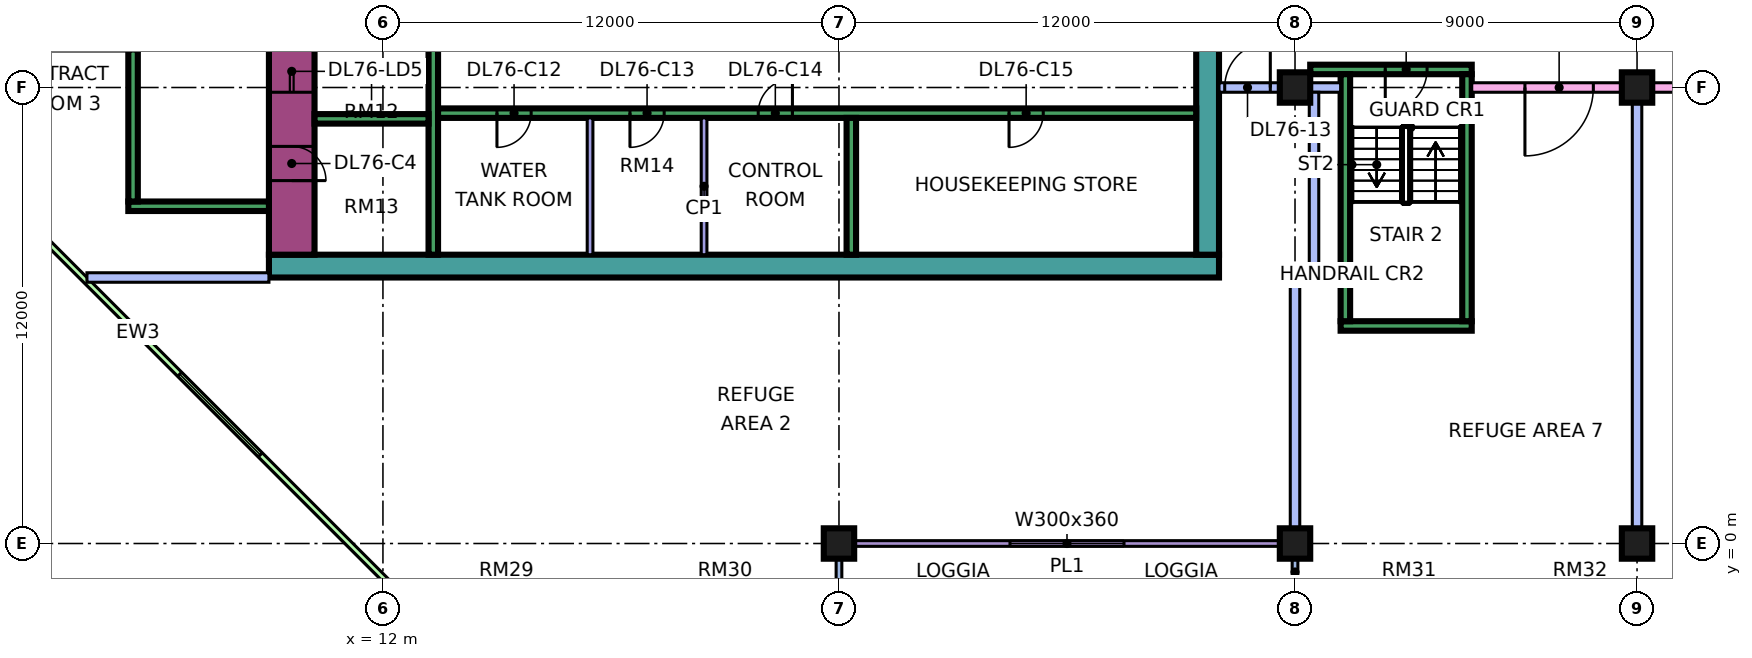
"""IFC4 building model, lengths in metres.
Left out: names, types, materials, properties, quantities, classifications, styles, units other than length and angle.
Written with IfcOpenShell. Run it as: python <this file> out.ifc"""

import sys

from ifc_helpers import new_model, si_unit, direction, frame, frame_2d, origin, origin_2d, place, context, subcontext, project, spatial, rectangle, extrude, element, fill, save


model = new_model("IFC4")
c1 = context("Model", 3, precision=1e-05, world=origin(), true_north=direction((0.0, 1.0)))
c2 = subcontext(c1, "Body", "Model", "MODEL_VIEW")
j1 = project(units=[si_unit("LENGTHUNIT", "METRE"), si_unit("PLANEANGLEUNIT", "RADIAN")], contexts=[c1])
p1 = place(None, origin())
s1 = spatial("IfcSite", under=j1, at=p1, CompositionType="ELEMENT")
p2 = place(p1, origin())
s2 = spatial("IfcBuilding", under=s1, at=p2, CompositionType="ELEMENT")
p3 = place(p2, frame((0.0, 0.0, 322.15)))
s3 = spatial("IfcBuildingStorey", under=s2, at=p3, CompositionType="ELEMENT", Elevation=322.15)
for number, where, z_axis, x_axis in (
    (1, (24.0, 0.0, 0.0), (0.0, 0.0, 1.0), (1.0, 0.0, 0.0)),
    (2, (36.0, 0.0, 0.0), (0.0, 0.0, 1.0), (1.0, 0.0, 0.0)),
    (3, (36.0, 12.0, 0.0), (0.0, 0.0, 1.0), (1.0, 0.0, 0.0)),
    (4, (45.0, 0.0, 0.0), (0.0, 0.0, 1.0), (1.0, 0.0, 0.0)),
    (5, (45.0, 12.0, 0.0), (0.0, 0.0, 1.0), (1.0, 0.0, 0.0)),
):
    element("IfcColumn", number, at=place(p3, frame(where, z_axis=z_axis, x_axis=x_axis)), inside=s3, PredefinedType="COLUMN", context=c2, shape_type="SweptSolid", body=[
        extrude(rectangle(XDim=0.8, YDim=0.8, at=origin_2d()), origin(), (0.0, 0.0, 1.0), 5.5),
    ])
p4 = place(p3, frame((9.0, 7.3, 0.0), z_axis=(0.0, 0.0, 1.0), x_axis=(1.0, 0.0, 0.0)))
e6 = element("IfcWall", 6, at=p4, inside=s3, PredefinedType="SHEAR", context=c2, shape_type="SweptSolid", body=[
    extrude(rectangle(XDim=25.0, YDim=0.6, at=frame_2d((12.5, 0.0))), origin(), (0.0, 0.0, 1.0), 5.5),
])
p5 = place(p3, frame((9.6, 7.6, 0.0), z_axis=(0.0, 0.0, 1.0), x_axis=(0.0, 1.0, 0.0)))
e7 = element("IfcWall", 7, at=p5, inside=s3, PredefinedType="SHEAR", context=c2, shape_type="SweptSolid", body=[
    extrude(rectangle(XDim=11.8, YDim=1.2, at=frame_2d((5.9, 0.0))), origin(), (0.0, 0.0, 1.0), 5.5),
])
p6 = place(p5, frame((4.275, 0.0, 0.0)))
e8 = element("IfcOpeningElement", 8, at=p6, cuts=e7, PredefinedType="OPENING", context=c2, shape_type="SweptSolid", body=[
    extrude(rectangle(XDim=1.1, YDim=2.2, at=frame_2d((0.55, 1.1))), frame((0.0, 0.61, 0.0), z_axis=(0.0, -1.0, 0.0), x_axis=(1.0, 0.0, 0.0)), (0.0, 0.0, 1.0), 1.22),
])
p7 = place(p5, frame((6.775, 0.0, 0.0)))
e9 = element("IfcOpeningElement", 9, at=p7, cuts=e7, PredefinedType="OPENING", context=c2, shape_type="SweptSolid", body=[
    extrude(rectangle(XDim=1.1, YDim=2.2, at=frame_2d((0.55, 1.1))), frame((0.0, 0.61, 0.0), z_axis=(0.0, -1.0, 0.0), x_axis=(1.0, 0.0, 0.0)), (0.0, 0.0, 1.0), 1.22),
])
p8 = place(p5, frame((9.7, 0.0, 0.0)))
e10 = element("IfcOpeningElement", 10, at=p8, cuts=e7, PredefinedType="OPENING", context=c2, shape_type="SweptSolid", body=[
    extrude(rectangle(XDim=1.1, YDim=2.2, at=frame_2d((0.55, 1.1))), frame((0.0, 0.61, 0.0), z_axis=(0.0, -1.0, 0.0), x_axis=(1.0, 0.0, 0.0)), (0.0, 0.0, 1.0), 1.22),
])
p9 = place(p5, frame((1.95, 0.0, 0.0)))
e11 = element("IfcOpeningElement", 11, at=p9, cuts=e7, PredefinedType="OPENING", context=c2, shape_type="SweptSolid", body=[
    extrude(rectangle(XDim=0.9, YDim=2.1, at=frame_2d((0.45, 1.05))), frame((0.0, 0.61, 0.0), z_axis=(0.0, -1.0, 0.0), x_axis=(1.0, 0.0, 0.0)), (0.0, 0.0, 1.0), 1.22),
])
p10 = place(p3, frame((33.7, 7.6, 0.0), z_axis=(0.0, 0.0, 1.0), x_axis=(0.0, 1.0, 0.0)))
e12 = element("IfcWall", 12, at=p10, inside=s3, PredefinedType="SHEAR", context=c2, shape_type="SweptSolid", body=[
    extrude(rectangle(XDim=11.8, YDim=0.6, at=frame_2d((5.9, 0.0))), origin(), (0.0, 0.0, 1.0), 5.5),
])
p11 = place(p10, frame((5.6, 0.0, 0.0)))
e13 = element("IfcOpeningElement", 13, at=p11, cuts=e12, PredefinedType="OPENING", context=c2, shape_type="SweptSolid", body=[
    extrude(rectangle(XDim=1.8, YDim=2.4, at=frame_2d((0.9, 1.2))), frame((0.0, 0.31, 0.0), z_axis=(0.0, -1.0, 0.0), x_axis=(1.0, 0.0, 0.0)), (0.0, 0.0, 1.0), 0.62),
])
p12 = place(p3, frame((13.325, 7.6, 0.0), z_axis=(0.0, 0.0, 1.0), x_axis=(0.0, 1.0, 0.0)))
e14 = element("IfcWall", 14, at=p12, inside=s3, PredefinedType="SHEAR", context=c2, shape_type="SweptSolid", body=[
    extrude(rectangle(XDim=11.8, YDim=0.25, at=frame_2d((5.9, 0.0))), origin(), (0.0, 0.0, 1.0), 5.5),
])
p13 = place(p3, frame((13.45, 11.325, 0.0), z_axis=(0.0, 0.0, 1.0), x_axis=(1.0, 0.0, 0.0)))
e15 = element("IfcWall", 15, at=p13, inside=s3, PredefinedType="SHEAR", context=c2, shape_type="SweptSolid", body=[
    extrude(rectangle(XDim=19.95, YDim=0.25, at=frame_2d((9.975, 0.0))), origin(), (0.0, 0.0, 1.0), 5.5),
])
p14 = place(p13, frame((1.55, 0.0, 0.0)))
e16 = element("IfcOpeningElement", 16, at=p14, cuts=e15, PredefinedType="OPENING", context=c2, shape_type="SweptSolid", body=[
    extrude(rectangle(XDim=0.9, YDim=2.1, at=frame_2d((0.45, 1.05))), frame((0.0, 0.135, 0.0), z_axis=(0.0, -1.0, 0.0), x_axis=(1.0, 0.0, 0.0)), (0.0, 0.0, 1.0), 0.27),
])
p15 = place(p13, frame((5.05, 0.0, 0.0)))
e17 = element("IfcOpeningElement", 17, at=p15, cuts=e15, PredefinedType="OPENING", context=c2, shape_type="SweptSolid", body=[
    extrude(rectangle(XDim=0.9, YDim=2.1, at=frame_2d((0.45, 1.05))), frame((0.0, 0.135, 0.0), z_axis=(0.0, -1.0, 0.0), x_axis=(1.0, 0.0, 0.0)), (0.0, 0.0, 1.0), 0.27),
])
p16 = place(p13, frame((8.425, 0.0, 0.0)))
e18 = element("IfcOpeningElement", 18, at=p16, cuts=e15, PredefinedType="OPENING", context=c2, shape_type="SweptSolid", body=[
    extrude(rectangle(XDim=0.9, YDim=2.1, at=frame_2d((0.45, 1.05))), frame((0.0, 0.135, 0.0), z_axis=(0.0, -1.0, 0.0), x_axis=(1.0, 0.0, 0.0)), (0.0, 0.0, 1.0), 0.27),
])
p17 = place(p13, frame((15.025, 0.0, 0.0)))
e19 = element("IfcOpeningElement", 19, at=p17, cuts=e15, PredefinedType="OPENING", context=c2, shape_type="SweptSolid", body=[
    extrude(rectangle(XDim=0.9, YDim=2.1, at=frame_2d((0.45, 1.05))), frame((0.0, 0.135, 0.0), z_axis=(0.0, -1.0, 0.0), x_axis=(1.0, 0.0, 0.0)), (0.0, 0.0, 1.0), 0.27),
])
p18 = place(p3, frame((10.2, 11.175, 0.0), z_axis=(0.0, 0.0, 1.0), x_axis=(1.0, 0.0, 0.0)))
e20 = element("IfcWall", 20, at=p18, inside=s3, PredefinedType="SHEAR", context=c2, shape_type="SweptSolid", body=[
    extrude(rectangle(XDim=3.0, YDim=0.25, at=frame_2d((1.5, 0.0))), origin(), (0.0, 0.0, 1.0), 5.5),
])
p19 = place(p3, frame((24.325, 7.6, 0.0), z_axis=(0.0, 0.0, 1.0), x_axis=(0.0, 1.0, 0.0)))
e21 = element("IfcWall", 21, at=p19, inside=s3, PredefinedType="SHEAR", context=c2, shape_type="SweptSolid", body=[
    extrude(rectangle(XDim=3.6, YDim=0.25, at=frame_2d((1.8, 0.0))), origin(), (0.0, 0.0, 1.0), 5.5),
])
p20 = place(p3, frame((5.3, 8.875, 0.0), z_axis=(0.0, 0.0, 1.0), x_axis=(1.0, 0.0, 0.0)))
e22 = element("IfcWall", 22, at=p20, inside=s3, PredefinedType="SHEAR", context=c2, shape_type="SweptSolid", body=[
    extrude(rectangle(XDim=3.7, YDim=0.25, at=frame_2d((1.85, 0.0))), origin(), (0.0, 0.0, 1.0), 5.5),
])
p21 = place(p3, frame((5.425, 9.0, 0.0), z_axis=(0.0, 0.0, 1.0), x_axis=(0.0, 1.0, 0.0)))
e23 = element("IfcWall", 23, at=p21, inside=s3, PredefinedType="SHEAR", context=c2, shape_type="SweptSolid", body=[
    extrude(rectangle(XDim=4.0, YDim=0.25, at=frame_2d((2.0, 0.0))), origin(), (0.0, 0.0, 1.0), 5.5),
])
p22 = place(p3, frame((37.2, 5.725, 0.0), z_axis=(0.0, 0.0, 1.0), x_axis=(1.0, 0.0, 0.0)))
e24 = element("IfcWall", 24, at=p22, inside=s3, PredefinedType="SHEAR", context=c2, shape_type="SweptSolid", body=[
    extrude(rectangle(XDim=3.45, YDim=0.25, at=frame_2d((1.725, 0.0))), origin(), (0.0, 0.0, 1.0), 5.5),
])
p23 = place(p3, frame((36.4, 12.475, 0.0), z_axis=(0.0, 0.0, 1.0), x_axis=(1.0, 0.0, 0.0)))
e25 = element("IfcWall", 25, at=p23, inside=s3, PredefinedType="SHEAR", context=c2, shape_type="SweptSolid", body=[
    extrude(rectangle(XDim=4.25, YDim=0.25, at=frame_2d((2.125, 0.0))), origin(), (0.0, 0.0, 1.0), 5.5),
])
p24 = place(p23, frame((1.975, 0.0, 0.0)))
e26 = element("IfcOpeningElement", 26, at=p24, cuts=e25, PredefinedType="OPENING", context=c2, shape_type="SweptSolid", body=[
    extrude(rectangle(XDim=1.1, YDim=2.2, at=frame_2d((0.55, 1.1))), frame((0.0, 0.135, 0.0), z_axis=(0.0, -1.0, 0.0), x_axis=(1.0, 0.0, 0.0)), (0.0, 0.0, 1.0), 0.27),
])
for number, where, z_axis, x_axis in (
    (27, (37.325, 5.85, 0.0), (0.0, 0.0, 1.0), (0.0, 1.0, 0.0)),
    (28, (40.525, 5.85, 0.0), (0.0, 0.0, 1.0), (0.0, 1.0, 0.0)),
):
    element("IfcWall", number, at=place(p3, frame(where, z_axis=z_axis, x_axis=x_axis)), inside=s3, PredefinedType="SHEAR", context=c2, shape_type="SweptSolid", body=[
        extrude(rectangle(XDim=6.5, YDim=0.25, at=frame_2d((3.25, 0.0))), origin(), (0.0, 0.0, 1.0), 5.5),
    ])
p25 = place(p3, frame((-1.447, 12.553, 0.0), z_axis=(0.0, 0.0, 1.0), x_axis=(0.707106781187, -0.707106781187, 0.0)))
e29 = element("IfcWall", 29, at=p25, inside=s3, PredefinedType="SOLIDWALL", context=c2, shape_type="SweptSolid", body=[
    extrude(rectangle(XDim=19.799, YDim=0.15, at=frame_2d((9.899, 0.0))), origin(), (0.0, 0.0, 1.0), 5.05),
])
p26 = place(p25, frame((11.453, 0.0, 0.45)))
e30 = element("IfcOpeningElement", 30, at=p26, cuts=e29, PredefinedType="OPENING", context=c2, shape_type="SweptSolid", body=[
    extrude(rectangle(XDim=3.0, YDim=3.6, at=frame_2d((1.5, 1.8))), frame((0.0, 0.085, 0.0), z_axis=(0.0, -1.0, 0.0), x_axis=(1.0, 0.0, 0.0)), (0.0, 0.0, 1.0), 0.17),
])
p27 = place(p3, frame((24.075, 0.0, 0.0), z_axis=(0.0, 0.0, 1.0), x_axis=(1.0, 0.0, 0.0)))
e31 = element("IfcWall", 31, at=p27, inside=s3, PredefinedType="SOLIDWALL", context=c2, shape_type="SweptSolid", body=[
    extrude(rectangle(XDim=11.85, YDim=0.15, at=frame_2d((5.925, 0.0))), origin(), (0.0, 0.0, 1.0), 5.05),
])
p28 = place(p27, frame((4.425, 0.0, 0.45)))
e32 = element("IfcOpeningElement", 32, at=p28, cuts=e31, PredefinedType="OPENING", context=c2, shape_type="SweptSolid", body=[
    extrude(rectangle(XDim=3.0, YDim=3.6, at=frame_2d((1.5, 1.8))), frame((0.0, 0.085, 0.0), z_axis=(0.0, -1.0, 0.0), x_axis=(1.0, 0.0, 0.0)), (0.0, 0.0, 1.0), 0.17),
])
for number, where, z_axis, x_axis in (
    (33, (24.0, -1.5, 0.0), (0.0, 0.0, 1.0), (0.0, 1.0, 0.0)),
    (34, (36.0, -1.5, 0.0), (0.0, 0.0, 1.0), (0.0, 1.0, 0.0)),
):
    element("IfcWall", number, at=place(p3, frame(where, z_axis=z_axis, x_axis=x_axis)), inside=s3, PredefinedType="SOLIDWALL", context=c2, shape_type="SweptSolid", body=[
        extrude(rectangle(XDim=1.5, YDim=0.15, at=frame_2d((0.75, 0.0))), origin(), (0.0, 0.0, 1.0), 5.05),
    ])
for number, where, z_axis, x_axis in (
    (35, (17.45, 7.6, 0.0), (0.0, 0.0, 1.0), (0.0, 1.0, 0.0)),
    (36, (20.45, 7.6, 0.0), (0.0, 0.0, 1.0), (0.0, 1.0, 0.0)),
):
    element("IfcWall", number, at=place(p3, frame(where, z_axis=z_axis, x_axis=x_axis)), inside=s3, PredefinedType="PARTITIONING", context=c2, shape_type="SweptSolid", body=[
        extrude(rectangle(XDim=3.6, YDim=0.15, at=frame_2d((1.8, 0.0))), origin(), (0.0, 0.0, 1.0), 5.05),
    ])
p29 = place(p3, frame((4.211, 7.0, 0.0), z_axis=(0.0, 0.0, 1.0), x_axis=(1.0, 0.0, 0.0)))
e37 = element("IfcWall", 37, at=p29, inside=s3, PredefinedType="PARTITIONING", context=c2, shape_type="SweptSolid", body=[
    extrude(rectangle(XDim=4.789, YDim=0.25, at=frame_2d((2.395, 0.0))), origin(), (0.0, 0.0, 1.0), 5.05),
])
p30 = place(p3, frame((34.0, 12.0, 0.0), z_axis=(0.0, 0.0, 1.0), x_axis=(1.0, 0.0, 0.0)))
e38 = element("IfcWall", 38, at=p30, inside=s3, PredefinedType="PARTITIONING", context=c2, shape_type="SweptSolid", body=[
    extrude(rectangle(XDim=3.2, YDim=0.25, at=frame_2d((1.6, 0.0))), origin(), (0.0, 0.0, 1.0), 5.05),
])
p31 = place(p30, frame((0.15, 0.0, 0.0)))
e39 = element("IfcOpeningElement", 39, at=p31, cuts=e38, PredefinedType="OPENING", context=c2, shape_type="SweptSolid", body=[
    extrude(rectangle(XDim=1.2, YDim=2.1, at=frame_2d((0.6, 1.05))), frame((0.0, 0.135, 0.0), z_axis=(0.0, -1.0, 0.0), x_axis=(1.0, 0.0, 0.0)), (0.0, 0.0, 1.0), 0.27),
])
p32 = place(p3, frame((36.0, 0.0, 0.0), z_axis=(0.0, 0.0, 1.0), x_axis=(0.0, 1.0, 0.0)))
e40 = element("IfcWall", 40, at=p32, inside=s3, PredefinedType="PARTITIONING", context=c2, shape_type="SweptSolid", body=[
    extrude(rectangle(XDim=7.125, YDim=0.25, at=frame_2d((3.562, 0.0))), origin(), (0.0, 0.0, 1.0), 5.05),
])
p33 = place(p3, frame((36.125, 7.0, 0.0), z_axis=(0.0, 0.0, 1.0), x_axis=(1.0, 0.0, 0.0)))
e41 = element("IfcWall", 41, at=p33, inside=s3, PredefinedType="PARTITIONING", context=c2, shape_type="SweptSolid", body=[
    extrude(rectangle(XDim=0.25, YDim=0.25, at=frame_2d((0.125, 0.0))), origin(), (0.0, 0.0, 1.0), 5.05),
])
p34 = place(p3, frame((36.5, 6.875, 0.0), z_axis=(0.0, 0.0, 1.0), x_axis=(0.0, 1.0, 0.0)))
e42 = element("IfcWall", 42, at=p34, inside=s3, PredefinedType="PARTITIONING", context=c2, shape_type="SweptSolid", body=[
    extrude(rectangle(XDim=5.0, YDim=0.25, at=frame_2d((2.5, 0.0))), origin(), (0.0, 0.0, 1.0), 5.05),
])
p35 = place(p3, frame((40.65, 12.0, 0.0), z_axis=(0.0, 0.0, 1.0), x_axis=(1.0, 0.0, 0.0)))
e43 = element("IfcWall", 43, at=p35, inside=s3, PredefinedType="PARTITIONING", context=c2, shape_type="SweptSolid", body=[
    extrude(rectangle(XDim=22.35, YDim=0.25, at=frame_2d((11.175, 0.0))), origin(), (0.0, 0.0, 1.0), 2.45),
])
p36 = place(p35, frame((1.4, 0.0, 0.0)))
e44 = element("IfcOpeningElement", 44, at=p36, cuts=e43, PredefinedType="OPENING", context=c2, shape_type="SweptSolid", body=[
    extrude(rectangle(XDim=1.8, YDim=2.1, at=frame_2d((0.9, 1.05))), frame((0.0, 0.135, 0.0), z_axis=(0.0, -1.0, 0.0), x_axis=(1.0, 0.0, 0.0)), (0.0, 0.0, 1.0), 0.27),
])
p37 = place(p35, frame((7.75, 0.0, 0.0)))
e45 = element("IfcOpeningElement", 45, at=p37, cuts=e43, PredefinedType="OPENING", context=c2, shape_type="SweptSolid", body=[
    extrude(rectangle(XDim=2.4, YDim=2.1, at=frame_2d((1.2, 1.05))), frame((0.0, 0.135, 0.0), z_axis=(0.0, -1.0, 0.0), x_axis=(1.0, 0.0, 0.0)), (0.0, 0.0, 1.0), 0.27),
])
p38 = place(p35, frame((16.75, 0.0, 0.0)))
e46 = element("IfcOpeningElement", 46, at=p38, cuts=e43, PredefinedType="OPENING", context=c2, shape_type="SweptSolid", body=[
    extrude(rectangle(XDim=2.4, YDim=2.1, at=frame_2d((1.2, 1.05))), frame((0.0, 0.135, 0.0), z_axis=(0.0, -1.0, 0.0), x_axis=(1.0, 0.0, 0.0)), (0.0, 0.0, 1.0), 0.27),
])
p39 = place(p3, frame((45.0, 0.0, 0.0), z_axis=(0.0, 0.0, 1.0), x_axis=(0.0, 1.0, 0.0)))
e47 = element("IfcWall", 47, at=p39, inside=s3, PredefinedType="PARTITIONING", context=c2, shape_type="SweptSolid", body=[
    extrude(rectangle(XDim=11.875, YDim=0.25, at=frame_2d((5.938, 0.0))), origin(), (0.0, 0.0, 1.0), 5.05),
])
p40 = place(p26, origin())
e48 = element("IfcWindow", 48, at=p40, inside=s3, PartitioningType="SINGLE_PANEL", PredefinedType="WINDOW", context=c2, shape_type="SweptSolid", body=[
    extrude(rectangle(XDim=3.0, YDim=3.6, at=frame_2d((1.5, 1.8))), frame((0.0, 0.03, 0.0), z_axis=(0.0, -1.0, 0.0), x_axis=(1.0, 0.0, 0.0)), (0.0, 0.0, 1.0), 0.06),
])
fill(e30, e48)
p41 = place(p28, origin())
e49 = element("IfcWindow", 49, at=p41, inside=s3, PartitioningType="SINGLE_PANEL", PredefinedType="WINDOW", context=c2, shape_type="SweptSolid", body=[
    extrude(rectangle(XDim=3.0, YDim=3.6, at=frame_2d((1.5, 1.8))), frame((0.0, 0.03, 0.0), z_axis=(0.0, -1.0, 0.0), x_axis=(1.0, 0.0, 0.0)), (0.0, 0.0, 1.0), 0.06),
])
fill(e32, e49)
p42 = place(p6, origin())
e50 = element("IfcDoor", 50, at=p42, inside=s3, OperationType="DOUBLE_DOOR_SLIDING", PredefinedType="DOOR", context=c2, shape_type="SweptSolid", body=[
    extrude(rectangle(XDim=1.1, YDim=2.2, at=frame_2d((0.55, 1.1))), frame((0.0, 0.025, 0.0), z_axis=(0.0, -1.0, 0.0), x_axis=(1.0, 0.0, 0.0)), (0.0, 0.0, 1.0), 0.05),
])
fill(e8, e50)
p43 = place(p9, frame((0.9, 0.0, 0.0), z_axis=(0.0, 0.0, 1.0), x_axis=(-1.0, 0.0, 0.0)))
e51 = element("IfcDoor", 51, at=p43, inside=s3, OperationType="SINGLE_SWING_LEFT", PredefinedType="DOOR", context=c2, shape_type="SweptSolid", body=[
    extrude(rectangle(XDim=0.9, YDim=2.1, at=frame_2d((0.45, 1.05))), frame((0.0, 0.025, 0.0), z_axis=(0.0, -1.0, 0.0), x_axis=(1.0, 0.0, 0.0)), (0.0, 0.0, 1.0), 0.05),
])
fill(e11, e51)
p44 = place(p24, frame((1.1, 0.0, 0.0), z_axis=(0.0, 0.0, 1.0), x_axis=(-1.0, 0.0, 0.0)))
e52 = element("IfcDoor", 52, at=p44, inside=s3, OperationType="SINGLE_SWING_LEFT", PredefinedType="DOOR", context=c2, shape_type="SweptSolid", body=[
    extrude(rectangle(XDim=1.1, YDim=2.2, at=frame_2d((0.55, 1.1))), frame((0.0, 0.025, 0.0), z_axis=(0.0, -1.0, 0.0), x_axis=(1.0, 0.0, 0.0)), (0.0, 0.0, 1.0), 0.05),
])
fill(e26, e52)
p45 = place(p14, frame((0.9, 0.0, 0.0), z_axis=(0.0, 0.0, 1.0), x_axis=(-1.0, 0.0, 0.0)))
e53 = element("IfcDoor", 53, at=p45, inside=s3, OperationType="SINGLE_SWING_LEFT", PredefinedType="DOOR", context=c2, shape_type="SweptSolid", body=[
    extrude(rectangle(XDim=0.9, YDim=2.1, at=frame_2d((0.45, 1.05))), frame((0.0, 0.025, 0.0), z_axis=(0.0, -1.0, 0.0), x_axis=(1.0, 0.0, 0.0)), (0.0, 0.0, 1.0), 0.05),
])
fill(e16, e53)
p46 = place(p15, frame((0.9, 0.0, 0.0), z_axis=(0.0, 0.0, 1.0), x_axis=(-1.0, 0.0, 0.0)))
e54 = element("IfcDoor", 54, at=p46, inside=s3, OperationType="SINGLE_SWING_LEFT", PredefinedType="DOOR", context=c2, shape_type="SweptSolid", body=[
    extrude(rectangle(XDim=0.9, YDim=2.1, at=frame_2d((0.45, 1.05))), frame((0.0, 0.025, 0.0), z_axis=(0.0, -1.0, 0.0), x_axis=(1.0, 0.0, 0.0)), (0.0, 0.0, 1.0), 0.05),
])
fill(e17, e54)
p47 = place(p16, frame((0.9, 0.0, 0.0), z_axis=(0.0, 0.0, 1.0), x_axis=(-1.0, 0.0, 0.0)))
e55 = element("IfcDoor", 55, at=p47, inside=s3, OperationType="SINGLE_SWING_RIGHT", PredefinedType="DOOR", context=c2, shape_type="SweptSolid", body=[
    extrude(rectangle(XDim=0.9, YDim=2.1, at=frame_2d((0.45, 1.05))), frame((0.0, 0.025, 0.0), z_axis=(0.0, -1.0, 0.0), x_axis=(1.0, 0.0, 0.0)), (0.0, 0.0, 1.0), 0.05),
])
fill(e18, e55)
p48 = place(p17, frame((0.9, 0.0, 0.0), z_axis=(0.0, 0.0, 1.0), x_axis=(-1.0, 0.0, 0.0)))
e56 = element("IfcDoor", 56, at=p48, inside=s3, OperationType="SINGLE_SWING_LEFT", PredefinedType="DOOR", context=c2, shape_type="SweptSolid", body=[
    extrude(rectangle(XDim=0.9, YDim=2.1, at=frame_2d((0.45, 1.05))), frame((0.0, 0.025, 0.0), z_axis=(0.0, -1.0, 0.0), x_axis=(1.0, 0.0, 0.0)), (0.0, 0.0, 1.0), 0.05),
])
fill(e19, e56)
p49 = place(p36, frame((1.8, 0.0, 0.0), z_axis=(0.0, 0.0, 1.0), x_axis=(-1.0, 0.0, 0.0)))
e57 = element("IfcDoor", 57, at=p49, inside=s3, OperationType="DOUBLE_DOOR_SINGLE_SWING", PredefinedType="DOOR", context=c2, shape_type="SweptSolid", body=[
    extrude(rectangle(XDim=1.8, YDim=2.1, at=frame_2d((0.9, 1.05))), frame((0.0, 0.025, 0.0), z_axis=(0.0, -1.0, 0.0), x_axis=(1.0, 0.0, 0.0)), (0.0, 0.0, 1.0), 0.05),
])
fill(e44, e57)
p50 = place(p31, frame((1.2, 0.0, 0.0), z_axis=(0.0, 0.0, 1.0), x_axis=(-1.0, 0.0, 0.0)))
e58 = element("IfcDoor", 58, at=p50, inside=s3, OperationType="SINGLE_SWING_RIGHT", PredefinedType="DOOR", context=c2, shape_type="SweptSolid", body=[
    extrude(rectangle(XDim=1.2, YDim=2.1, at=frame_2d((0.6, 1.05))), frame((0.0, 0.025, 0.0), z_axis=(0.0, -1.0, 0.0), x_axis=(1.0, 0.0, 0.0)), (0.0, 0.0, 1.0), 0.05),
])
fill(e39, e58)
save(model, sys.argv[1])
